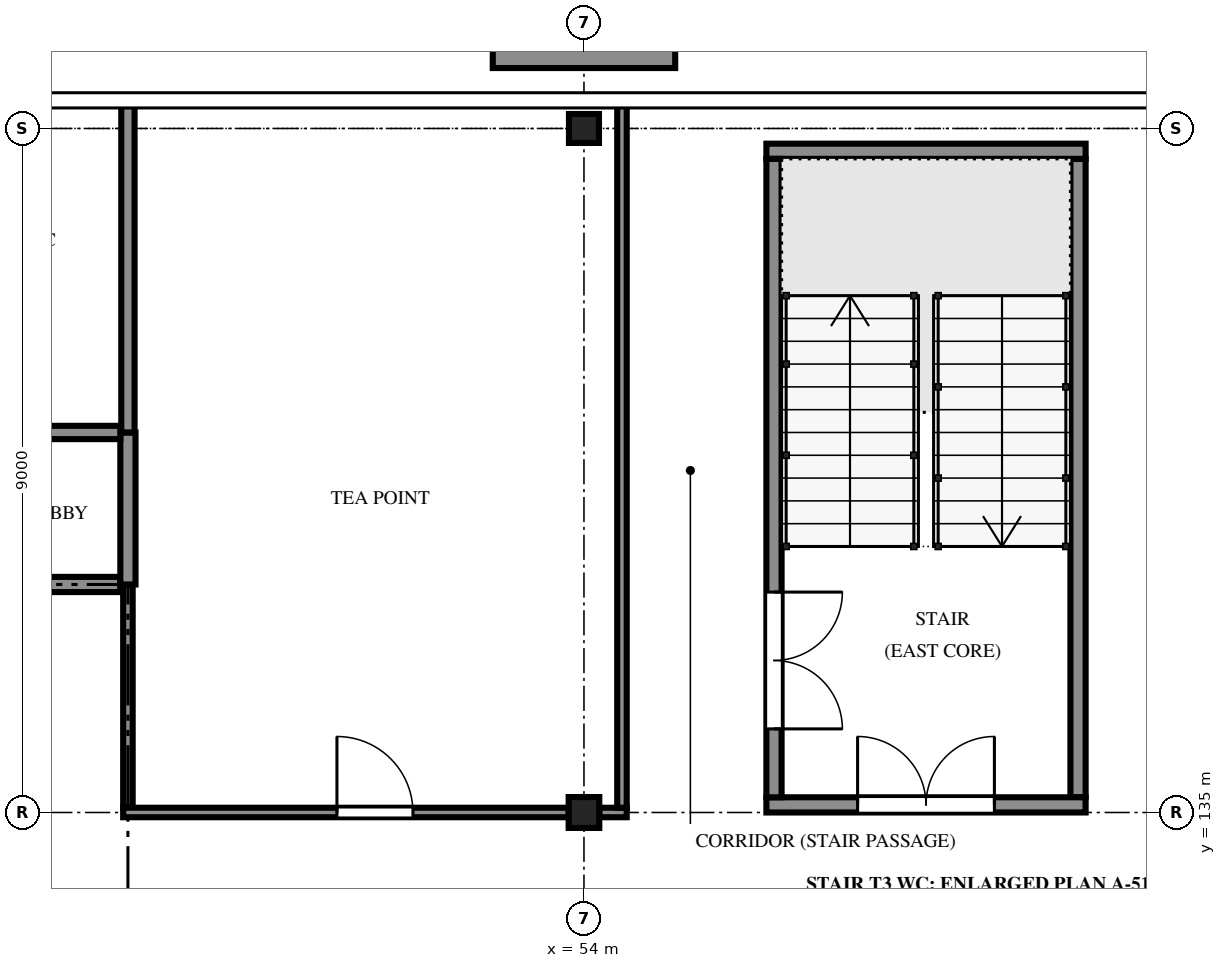
"""IFC4 building model, lengths in metres.
Left out: names, types, materials, properties, quantities, classifications, styles, units other than length and angle.
Written with IfcOpenShell. Run it as: python <this file> out.ifc"""

import sys

from ifc_helpers import new_model, si_unit, direction, frame, frame_2d, origin, origin_2d, place, context, subcontext, project, spatial, polyline, rectangle, i_section, outline, extrude, element, fill, save


model = new_model("IFC4")
c1 = context("Model", 3, precision=1e-05, world=origin(), true_north=direction((0.0, 1.0)))
c2 = subcontext(c1, "Body", "Model", "MODEL_VIEW")
j1 = project(units=[si_unit("LENGTHUNIT", "METRE"), si_unit("PLANEANGLEUNIT", "RADIAN")], contexts=[c1])
p1 = place(None, origin())
s1 = spatial("IfcSite", under=j1, at=p1, CompositionType="ELEMENT")
p2 = place(p1, origin())
s2 = spatial("IfcBuilding", under=s1, at=p2, CompositionType="ELEMENT")
p3 = place(p2, frame((0.0, 0.0, 15.9)))
s3 = spatial("IfcBuildingStorey", under=s2, at=p3, CompositionType="ELEMENT", Elevation=15.9)
p4 = place(p3, frame((54.0, 135.0, 0.0), z_axis=(0.0, 0.0, 1.0), x_axis=(1.0, 0.0, 0.0)))
e1 = element("IfcColumn", 1, at=p4, inside=s3, PredefinedType="COLUMN", context=c2, shape_type="SweptSolid", body=[
    extrude(i_section(OverallWidth=0.403, OverallDepth=0.406, WebThickness=0.027, FlangeThickness=0.043, FilletRadius=0.015, at=origin_2d()), origin(), (0.0, 0.0, 1.0), 4.2),
])
p5 = place(p3, frame((54.0, 144.0, 0.0), z_axis=(0.0, 0.0, 1.0), x_axis=(1.0, 0.0, 0.0)))
e2 = element("IfcColumn", 2, at=p5, inside=s3, PredefinedType="COLUMN", context=c2, shape_type="SweptSolid", body=[
    extrude(i_section(OverallWidth=0.395, OverallDepth=0.381, WebThickness=0.018, FlangeThickness=0.03, FilletRadius=0.015, at=origin_2d()), origin(), (0.0, 0.0, 1.0), 4.2),
])
p6 = place(p3, frame((52.8, 145.62, 0.0), z_axis=(0.0, 0.0, 1.0), x_axis=(1.0, 0.0, 0.0)))
e3 = element("IfcWall", 3, at=p6, inside=s3, PredefinedType="SOLIDWALL", context=c2, shape_type="SweptSolid", body=[
    extrude(rectangle(XDim=2.4, YDim=1.65, at=frame_2d((1.2, 0.0))), origin(), (0.0, 0.0, 1.0), 4.2),
])
p7 = place(p3, frame((56.4, 135.1, -0.13), z_axis=(0.0, 0.0, 1.0), x_axis=(1.0, 0.0, 0.0)))
e4 = element("IfcWall", 4, at=p7, inside=s3, PredefinedType="SOLIDWALL", context=c2, shape_type="SweptSolid", body=[
    extrude(rectangle(XDim=4.2, YDim=0.2, at=frame_2d((2.1, 0.0))), origin(), (0.0, 0.0, 1.0), 3.587),
])
p8 = place(p7, frame((1.2, 0.0, 0.13)))
e5 = element("IfcOpeningElement", 5, at=p8, cuts=e4, PredefinedType="OPENING", context=c2, shape_type="SweptSolid", body=[
    extrude(rectangle(XDim=1.8, YDim=2.1, at=frame_2d((0.9, 1.05))), frame((0.0, 0.11, 0.0), z_axis=(0.0, -1.0, 0.0), x_axis=(1.0, 0.0, 0.0)), (0.0, 0.0, 1.0), 0.22),
])
p9 = place(p3, frame((56.4, 143.7, 0.0), z_axis=(0.0, 0.0, 1.0), x_axis=(1.0, 0.0, 0.0)))
e6 = element("IfcWall", 6, at=p9, inside=s3, PredefinedType="SOLIDWALL", context=c2, shape_type="SweptSolid", body=[
    extrude(rectangle(XDim=4.2, YDim=0.2, at=frame_2d((2.1, 0.0))), origin(), (0.0, 0.0, 1.0), 3.457),
])
p10 = place(p3, frame((56.5, 135.2, -0.13), z_axis=(0.0, 0.0, 1.0), x_axis=(0.0, 1.0, 0.0)))
e7 = element("IfcWall", 7, at=p10, inside=s3, PredefinedType="SOLIDWALL", context=c2, shape_type="SweptSolid", body=[
    extrude(rectangle(XDim=8.4, YDim=0.2, at=frame_2d((4.2, 0.0))), origin(), (0.0, 0.0, 1.0), 3.587),
])
p11 = place(p10, frame((0.9, 0.0, 0.13)))
e8 = element("IfcOpeningElement", 8, at=p11, cuts=e7, PredefinedType="OPENING", context=c2, shape_type="SweptSolid", body=[
    extrude(rectangle(XDim=1.8, YDim=2.1, at=frame_2d((0.9, 1.05))), frame((0.0, 0.11, 0.0), z_axis=(0.0, -1.0, 0.0), x_axis=(1.0, 0.0, 0.0)), (0.0, 0.0, 1.0), 0.22),
])
p12 = place(p3, frame((60.5, 135.2, -0.13), z_axis=(0.0, 0.0, 1.0), x_axis=(0.0, 1.0, 0.0)))
e9 = element("IfcWall", 9, at=p12, inside=s3, PredefinedType="SOLIDWALL", context=c2, shape_type="SweptSolid", body=[
    extrude(rectangle(XDim=8.4, YDim=0.2, at=frame_2d((4.2, 0.0))), origin(), (0.0, 0.0, 1.0), 3.587),
])
p13 = place(p3, frame((48.0, 138.0, 0.0), z_axis=(0.0, 0.0, 1.0), x_axis=(0.0, -1.0, 0.0)))
e10 = element("IfcWall", 10, at=p13, inside=s3, PredefinedType="PARTITIONING", context=c2, shape_type="SweptSolid", body=[
    extrude(rectangle(XDim=2.938, YDim=0.125, at=frame_2d((1.469, 0.0))), origin(), (0.0, 0.0, 1.0), 3.287),
])
p14 = place(p3, frame((47.938, 135.0, 0.0), z_axis=(0.0, 0.0, 1.0), x_axis=(1.0, 0.0, 0.0)))
e11 = element("IfcWall", 11, at=p14, inside=s3, PredefinedType="PARTITIONING", context=c2, shape_type="SweptSolid", body=[
    extrude(rectangle(XDim=5.861, YDim=0.125, at=frame_2d((2.931, 0.0))), origin(), (0.0, 0.0, 1.0), 3.287),
])
p15 = place(p14, frame((2.812, 0.0, 0.0)))
e12 = element("IfcOpeningElement", 12, at=p15, cuts=e11, PredefinedType="OPENING", context=c2, shape_type="SweptSolid", body=[
    extrude(rectangle(XDim=1.0, YDim=2.1, at=frame_2d((0.5, 1.05))), frame((0.0, 0.073, 0.0), z_axis=(0.0, -1.0, 0.0), x_axis=(1.0, 0.0, 0.0)), (0.0, 0.0, 1.0), 0.145),
])
p16 = place(p3, frame((54.201, 135.0, 0.0), z_axis=(0.0, 0.0, 1.0), x_axis=(1.0, 0.0, 0.0)))
e13 = element("IfcWall", 13, at=p16, inside=s3, PredefinedType="PARTITIONING", context=c2, shape_type="SweptSolid", body=[
    extrude(rectangle(XDim=0.361, YDim=0.125, at=frame_2d((0.181, 0.0))), origin(), (0.0, 0.0, 1.0), 3.287),
])
p17 = place(p3, frame((38.0, 138.0, 0.0), z_axis=(0.0, 0.0, 1.0), x_axis=(1.0, 0.0, 0.0)))
e14 = element("IfcWall", 14, at=p17, inside=s3, PredefinedType="PARTITIONING", context=c2, shape_type="SweptSolid", body=[
    extrude(rectangle(XDim=9.9, YDim=0.2, at=frame_2d((4.95, 0.0))), origin(), (0.0, 0.0, 1.0), 3.382),
])
p18 = place(p17, frame((4.4, 0.0, 0.0)))
e15 = element("IfcOpeningElement", 15, at=p18, cuts=e14, PredefinedType="OPENING", context=c2, shape_type="SweptSolid", body=[
    extrude(rectangle(XDim=1.2, YDim=2.1, at=frame_2d((0.6, 1.05))), frame((0.0, 0.11, 0.0), z_axis=(0.0, -1.0, 0.0), x_axis=(1.0, 0.0, 0.0)), (0.0, 0.0, 1.0), 0.22),
])
p19 = place(p3, frame((54.5, 135.062, 0.0), z_axis=(0.0, 0.0, 1.0), x_axis=(0.0, 1.0, 0.0)))
e16 = element("IfcWall", 16, at=p19, inside=s3, PredefinedType="PARTITIONING", context=c2, shape_type="SweptSolid", body=[
    extrude(rectangle(XDim=9.232, YDim=0.125, at=frame_2d((4.616, 0.0))), origin(), (0.0, 0.0, 1.0), 3.287),
])
p20 = place(p3, frame((48.0, 140.0, 0.0), z_axis=(0.0, 0.0, 1.0), x_axis=(0.0, -1.0, 0.0)))
e17 = element("IfcWall", 17, at=p20, inside=s3, PredefinedType="PARTITIONING", context=c2, shape_type="SweptSolid", body=[
    extrude(rectangle(XDim=2.0, YDim=0.2, at=frame_2d((1.0, 0.0))), origin(), (0.0, 0.0, 1.0), 3.382),
])
p21 = place(p3, frame((44.2, 140.0, 0.0), z_axis=(0.0, 0.0, 1.0), x_axis=(1.0, 0.0, 0.0)))
e18 = element("IfcWall", 18, at=p21, inside=s3, PredefinedType="PARTITIONING", context=c2, shape_type="SweptSolid", body=[
    extrude(rectangle(XDim=3.7, YDim=0.175, at=frame_2d((1.85, 0.0))), origin(), (0.0, 0.0, 1.0), 3.307),
])
p22 = place(p21, frame((1.45, 0.0, 0.0)))
e19 = element("IfcOpeningElement", 19, at=p22, cuts=e18, PredefinedType="OPENING", context=c2, shape_type="SweptSolid", body=[
    extrude(rectangle(XDim=0.9, YDim=2.1, at=frame_2d((0.45, 1.05))), frame((0.0, 0.097, 0.0), z_axis=(0.0, -1.0, 0.0), x_axis=(1.0, 0.0, 0.0)), (0.0, 0.0, 1.0), 0.195),
])
p23 = place(p3, frame((48.0, 144.295, 0.0), z_axis=(0.0, 0.0, 1.0), x_axis=(0.0, -1.0, 0.0)))
e20 = element("IfcWall", 20, at=p23, inside=s3, PredefinedType="PARTITIONING", context=c2, shape_type="SweptSolid", body=[
    extrude(rectangle(XDim=4.295, YDim=0.175, at=frame_2d((2.147, 0.0))), origin(), (0.0, 0.0, 1.0), 3.307),
])
p24 = place(p11, frame((1.8, 0.0, 0.0), z_axis=(0.0, 0.0, 1.0), x_axis=(-1.0, 0.0, 0.0)))
e21 = element("IfcDoor", 21, at=p24, inside=s3, OperationType="DOUBLE_DOOR_SINGLE_SWING", PredefinedType="DOOR", context=c2, shape_type="SweptSolid", body=[
    extrude(outline(polyline([(0.0, 0.0), (0.07, 0.0), (0.07, 2.03), (1.73, 2.03), (1.73, 0.0), (1.8, 0.0), (1.8, 2.1), (0.0, 2.1), (0.0, 0.0)])), frame((0.0, 0.025, 0.0), z_axis=(0.0, -1.0, 0.0), x_axis=(1.0, 0.0, 0.0)), (0.0, 0.0, 1.0), 0.05),
    extrude(outline(polyline([(0.074, 0.01), (0.897, 0.01), (0.897, 2.026), (0.074, 2.026), (0.074, 0.01)]), holes=[polyline([(0.194, 0.16), (0.777, 0.16), (0.777, 1.01), (0.194, 1.01), (0.194, 0.16)]), polyline([(0.335, 1.16), (0.635, 1.16), (0.635, 1.76), (0.335, 1.76), (0.335, 1.16)])]), frame((0.0, 0.017, 0.0), z_axis=(0.0, -1.0, 0.0), x_axis=(1.0, 0.0, 0.0)), (0.0, 0.0, 1.0), 0.035),
    extrude(rectangle(XDim=0.583, YDim=0.85, at=frame_2d((0.485, 0.585))), frame((0.0, 0.009, 0.0), z_axis=(0.0, -1.0, 0.0), x_axis=(1.0, 0.0, 0.0)), (0.0, 0.0, 1.0), 0.017),
    extrude(rectangle(XDim=0.3, YDim=0.6, at=frame_2d((0.485, 1.46))), frame((0.0, 0.006, 0.0), z_axis=(0.0, -1.0, 0.0), x_axis=(1.0, 0.0, 0.0)), (0.0, 0.0, 1.0), 0.012),
    extrude(outline(polyline([(0.903, 0.01), (1.726, 0.01), (1.726, 2.026), (0.903, 2.026), (0.903, 0.01)]), holes=[polyline([(1.023, 0.16), (1.606, 0.16), (1.606, 1.01), (1.023, 1.01), (1.023, 0.16)]), polyline([(1.165, 1.16), (1.465, 1.16), (1.465, 1.76), (1.165, 1.76), (1.165, 1.16)])]), frame((0.0, 0.017, 0.0), z_axis=(0.0, -1.0, 0.0), x_axis=(1.0, 0.0, 0.0)), (0.0, 0.0, 1.0), 0.035),
    extrude(rectangle(XDim=0.583, YDim=0.85, at=frame_2d((1.314, 0.585))), frame((0.0, 0.009, 0.0), z_axis=(0.0, -1.0, 0.0), x_axis=(1.0, 0.0, 0.0)), (0.0, 0.0, 1.0), 0.017),
    extrude(rectangle(XDim=0.3, YDim=0.6, at=frame_2d((1.314, 1.46))), frame((0.0, 0.006, 0.0), z_axis=(0.0, -1.0, 0.0), x_axis=(1.0, 0.0, 0.0)), (0.0, 0.0, 1.0), 0.012),
])
fill(e8, e21)
p25 = place(p8, origin())
e22 = element("IfcDoor", 22, at=p25, inside=s3, OperationType="DOUBLE_DOOR_SINGLE_SWING", PredefinedType="DOOR", context=c2, shape_type="SweptSolid", body=[
    extrude(outline(polyline([(0.0, 0.0), (0.07, 0.0), (0.07, 2.03), (1.73, 2.03), (1.73, 0.0), (1.8, 0.0), (1.8, 2.1), (0.0, 2.1), (0.0, 0.0)])), frame((0.0, 0.025, 0.0), z_axis=(0.0, -1.0, 0.0), x_axis=(1.0, 0.0, 0.0)), (0.0, 0.0, 1.0), 0.05),
    extrude(outline(polyline([(0.074, 0.01), (0.897, 0.01), (0.897, 2.026), (0.074, 2.026), (0.074, 0.01)]), holes=[polyline([(0.194, 0.16), (0.777, 0.16), (0.777, 1.01), (0.194, 1.01), (0.194, 0.16)]), polyline([(0.335, 1.16), (0.635, 1.16), (0.635, 1.76), (0.335, 1.76), (0.335, 1.16)])]), frame((0.0, 0.017, 0.0), z_axis=(0.0, -1.0, 0.0), x_axis=(1.0, 0.0, 0.0)), (0.0, 0.0, 1.0), 0.035),
    extrude(rectangle(XDim=0.583, YDim=0.85, at=frame_2d((0.485, 0.585))), frame((0.0, 0.009, 0.0), z_axis=(0.0, -1.0, 0.0), x_axis=(1.0, 0.0, 0.0)), (0.0, 0.0, 1.0), 0.017),
    extrude(rectangle(XDim=0.3, YDim=0.6, at=frame_2d((0.485, 1.46))), frame((0.0, 0.006, 0.0), z_axis=(0.0, -1.0, 0.0), x_axis=(1.0, 0.0, 0.0)), (0.0, 0.0, 1.0), 0.012),
    extrude(outline(polyline([(0.903, 0.01), (1.726, 0.01), (1.726, 2.026), (0.903, 2.026), (0.903, 0.01)]), holes=[polyline([(1.023, 0.16), (1.606, 0.16), (1.606, 1.01), (1.023, 1.01), (1.023, 0.16)]), polyline([(1.165, 1.16), (1.465, 1.16), (1.465, 1.76), (1.165, 1.76), (1.165, 1.16)])]), frame((0.0, 0.017, 0.0), z_axis=(0.0, -1.0, 0.0), x_axis=(1.0, 0.0, 0.0)), (0.0, 0.0, 1.0), 0.035),
    extrude(rectangle(XDim=0.583, YDim=0.85, at=frame_2d((1.314, 0.585))), frame((0.0, 0.009, 0.0), z_axis=(0.0, -1.0, 0.0), x_axis=(1.0, 0.0, 0.0)), (0.0, 0.0, 1.0), 0.017),
    extrude(rectangle(XDim=0.3, YDim=0.6, at=frame_2d((1.314, 1.46))), frame((0.0, 0.006, 0.0), z_axis=(0.0, -1.0, 0.0), x_axis=(1.0, 0.0, 0.0)), (0.0, 0.0, 1.0), 0.012),
])
fill(e5, e22)
p26 = place(p15, origin())
e23 = element("IfcDoor", 23, at=p26, inside=s3, OperationType="SINGLE_SWING_LEFT", PredefinedType="DOOR", context=c2, shape_type="SweptSolid", body=[
    extrude(outline(polyline([(0.0, 0.0), (0.07, 0.0), (0.07, 2.03), (0.93, 2.03), (0.93, 0.0), (1.0, 0.0), (1.0, 2.1), (0.0, 2.1), (0.0, 0.0)])), frame((0.0, 0.025, 0.0), z_axis=(0.0, -1.0, 0.0), x_axis=(1.0, 0.0, 0.0)), (0.0, 0.0, 1.0), 0.05),
    extrude(outline(polyline([(0.074, 0.01), (0.926, 0.01), (0.926, 2.026), (0.074, 2.026), (0.074, 0.01)]), holes=[polyline([(0.194, 0.16), (0.806, 0.16), (0.806, 1.01), (0.194, 1.01), (0.194, 0.16)]), polyline([(0.35, 1.16), (0.65, 1.16), (0.65, 1.76), (0.35, 1.76), (0.35, 1.16)])]), frame((0.0, 0.017, 0.0), z_axis=(0.0, -1.0, 0.0), x_axis=(1.0, 0.0, 0.0)), (0.0, 0.0, 1.0), 0.035),
    extrude(rectangle(XDim=0.612, YDim=0.85, at=frame_2d((0.5, 0.585))), frame((0.0, 0.009, 0.0), z_axis=(0.0, -1.0, 0.0), x_axis=(1.0, 0.0, 0.0)), (0.0, 0.0, 1.0), 0.017),
    extrude(rectangle(XDim=0.3, YDim=0.6, at=frame_2d((0.5, 1.46))), frame((0.0, 0.006, 0.0), z_axis=(0.0, -1.0, 0.0), x_axis=(1.0, 0.0, 0.0)), (0.0, 0.0, 1.0), 0.012),
])
fill(e12, e23)
save(model, sys.argv[1])
